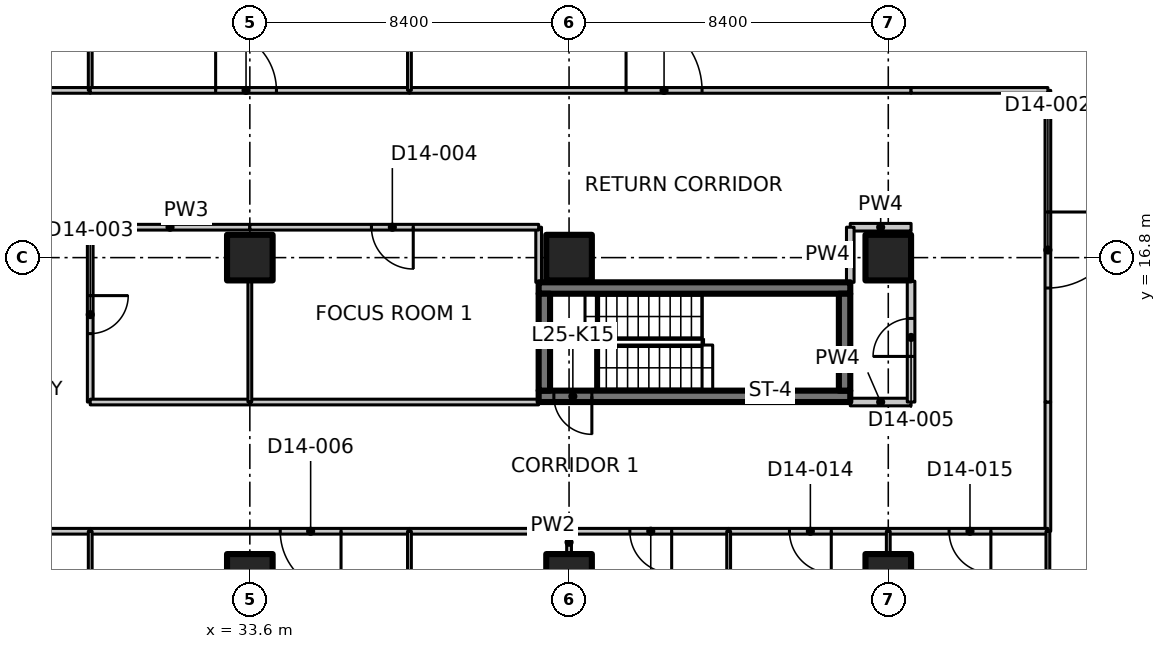
"""IFC4 building model, lengths in metres.
Left out: names, types, materials, properties, quantities, classifications, styles, units other than length and angle.
Written with IfcOpenShell. Run it as: python <this file> out.ifc"""

import sys

from ifc_helpers import new_model, si_unit, direction, frame, frame_2d, origin, origin_2d, place, context, subcontext, project, spatial, polyline, rectangle, outline, extrude, element, fill, save


model = new_model("IFC4")
c1 = context("Model", 3, precision=1e-05, world=origin(), true_north=direction((0.0, 1.0)))
c2 = subcontext(c1, "Body", "Model", "MODEL_VIEW")
j1 = project(units=[si_unit("LENGTHUNIT", "METRE"), si_unit("PLANEANGLEUNIT", "RADIAN")], contexts=[c1])
p1 = place(None, origin())
s1 = spatial("IfcSite", under=j1, at=p1, CompositionType="ELEMENT")
p2 = place(p1, origin())
s2 = spatial("IfcBuilding", under=s1, at=p2, CompositionType="ELEMENT")
p3 = place(p2, frame((0.0, 0.0, 106.1)))
s3 = spatial("IfcBuildingStorey", under=s2, at=p3, CompositionType="ELEMENT", Elevation=106.1)
for number, where, z_axis, x_axis in (
    (1, (33.6, 8.4, 0.0), (0.0, 0.0, 1.0), (1.0, 0.0, 0.0)),
    (2, (33.6, 16.8, 0.0), (0.0, 0.0, 1.0), (1.0, 0.0, 0.0)),
    (3, (42.0, 8.4, 0.0), (0.0, 0.0, 1.0), (1.0, 0.0, 0.0)),
    (4, (42.0, 16.8, 0.0), (0.0, 0.0, 1.0), (1.0, 0.0, 0.0)),
    (5, (50.4, 8.4, 0.0), (0.0, 0.0, 1.0), (1.0, 0.0, 0.0)),
    (6, (50.4, 16.8, 0.0), (0.0, 0.0, 1.0), (1.0, 0.0, 0.0)),
):
    element("IfcColumn", number, at=place(p3, frame(where, z_axis=z_axis, x_axis=x_axis)), inside=s3, PredefinedType="COLUMN", context=c2, shape_type="SweptSolid", body=[
        extrude(rectangle(XDim=1.2, YDim=1.2, at=origin_2d()), origin(), (0.0, 0.0, 1.0), 3.35),
    ])
p4 = place(p3, frame((49.4, 13.15, 0.0), z_axis=(0.0, 0.0, 1.0), x_axis=(-1.0, 0.0, 0.0)))
e7 = element("IfcWall", 7, at=p4, inside=s3, PredefinedType="SHEAR", context=c2, shape_type="SweptSolid", body=[
    extrude(rectangle(XDim=8.2, YDim=0.3, at=frame_2d((4.1, 0.0))), origin(), (0.0, 0.0, 1.0), 3.35),
])
p5 = place(p4, frame((6.8, 0.0, 0.0)))
e8 = element("IfcOpeningElement", 8, at=p5, cuts=e7, PredefinedType="OPENING", context=c2, shape_type="SweptSolid", body=[
    extrude(rectangle(XDim=1.0, YDim=2.1, at=frame_2d((0.5, 1.05))), frame((0.0, 0.16, 0.0), z_axis=(0.0, -1.0, 0.0), x_axis=(1.0, 0.0, 0.0)), (0.0, 0.0, 1.0), 0.32),
])
p6 = place(p3, frame((41.2, 16.0, 0.0), z_axis=(0.0, 0.0, 1.0), x_axis=(1.0, 0.0, 0.0)))
e9 = element("IfcWall", 9, at=p6, inside=s3, PredefinedType="SHEAR", context=c2, shape_type="SweptSolid", body=[
    extrude(rectangle(XDim=8.2, YDim=0.3, at=frame_2d((4.1, 0.0))), origin(), (0.0, 0.0, 1.0), 3.35),
])
for number, where, z_axis, x_axis in (
    (10, (41.35, 13.3, 0.0), (0.0, 0.0, 1.0), (0.0, 1.0, 0.0)),
    (11, (49.25, 13.3, 0.0), (0.0, 0.0, 1.0), (0.0, 1.0, 0.0)),
):
    element("IfcWall", number, at=place(p3, frame(where, z_axis=z_axis, x_axis=x_axis)), inside=s3, PredefinedType="SHEAR", context=c2, shape_type="SweptSolid", body=[
        extrude(rectangle(XDim=2.55, YDim=0.3, at=frame_2d((1.275, 0.0))), origin(), (0.0, 0.0, 1.0), 3.35),
    ])
p7 = place(p3, frame((25.2, 21.2, 0.0), z_axis=(0.0, 0.0, 1.0), x_axis=(1.0, 0.0, 0.0)))
e12 = element("IfcWall", 12, at=p7, inside=s3, PredefinedType="PARTITIONING", context=c2, shape_type="SweptSolid", body=[
    extrude(rectangle(XDim=4.2, YDim=0.15, at=frame_2d((2.1, 0.0))), origin(), (0.0, 0.0, 1.0), 3.33),
])
p8 = place(p3, frame((29.4, 17.6, 0.0), z_axis=(0.0, 0.0, 1.0), x_axis=(0.0, -1.0, 0.0)))
e13 = element("IfcWall", 13, at=p8, inside=s3, PredefinedType="PARTITIONING", context=c2, shape_type="SweptSolid", body=[
    extrude(rectangle(XDim=4.6, YDim=0.15, at=frame_2d((2.3, 0.0))), origin(), (0.0, 0.0, 1.0), 3.33),
])
p9 = place(p8, frame((1.8, 0.0, 0.0)))
e14 = element("IfcOpeningElement", 14, at=p9, cuts=e13, PredefinedType="OPENING", context=c2, shape_type="SweptSolid", body=[
    extrude(rectangle(XDim=1.0, YDim=2.1, at=frame_2d((0.5, 1.05))), frame((0.0, 0.085, 0.0), z_axis=(0.0, -1.0, 0.0), x_axis=(1.0, 0.0, 0.0)), (0.0, 0.0, 1.0), 0.17),
])
p10 = place(p3, frame((29.4, 9.6, 0.0), z_axis=(0.0, 0.0, 1.0), x_axis=(-1.0, 0.0, 0.0)))
e15 = element("IfcWall", 15, at=p10, inside=s3, PredefinedType="PARTITIONING", context=c2, shape_type="SweptSolid", body=[
    extrude(rectangle(XDim=4.2, YDim=0.15, at=frame_2d((2.1, 0.0))), origin(), (0.0, 0.0, 1.0), 3.33),
])
p11 = place(p3, frame((29.4, 27.511, 0.0), z_axis=(0.0, 0.0, 1.0), x_axis=(0.0, -1.0, 0.0)))
e16 = element("IfcWall", 16, at=p11, inside=s3, PredefinedType="PARTITIONING", context=c2, shape_type="SweptSolid", body=[
    extrude(outline(polyline([(0.0, 0.0), (6.311, 0.0), (6.311, 3.33), (2.761, 3.33), (2.759, 2.98), (1.863, 2.98), (1.861, 3.33), (0.236, 3.33), (0.0, 3.33), (0.0, 0.0)])), frame((0.0, 0.05, 0.0), z_axis=(0.0, -1.0, 0.0), x_axis=(1.0, 0.0, 0.0)), (0.0, 0.0, 1.0), 0.1),
])
p12 = place(p3, frame((54.6, 13.0, 0.0), z_axis=(0.0, 0.0, 1.0), x_axis=(0.0, -1.0, 0.0)))
e17 = element("IfcWall", 17, at=p12, inside=s3, PredefinedType="PARTITIONING", context=c2, shape_type="SweptSolid", body=[
    extrude(rectangle(XDim=3.4, YDim=0.15, at=frame_2d((1.7, 0.0))), origin(), (0.0, 0.0, 1.0), 3.33),
])
p13 = place(p3, frame((29.4, 13.0, 0.0), z_axis=(0.0, 0.0, 1.0), x_axis=(1.0, 0.0, 0.0)))
e18 = element("IfcWall", 18, at=p13, inside=s3, PredefinedType="PARTITIONING", context=c2, shape_type="SweptSolid", body=[
    extrude(rectangle(XDim=4.2, YDim=0.15, at=frame_2d((2.1, 0.0))), origin(), (0.0, 0.0, 1.0), 3.33),
])
p14 = place(p3, frame((33.6, 13.0, 0.0), z_axis=(0.0, 0.0, 1.0), x_axis=(1.0, 0.0, 0.0)))
e19 = element("IfcWall", 19, at=p14, inside=s3, PredefinedType="PARTITIONING", context=c2, shape_type="SweptSolid", body=[
    extrude(rectangle(XDim=7.6, YDim=0.15, at=frame_2d((3.8, 0.0))), origin(), (0.0, 0.0, 1.0), 3.33),
])
p15 = place(p3, frame((49.4, 13.0, 0.0), z_axis=(0.0, 0.0, 1.0), x_axis=(1.0, 0.0, 0.0)))
e20 = element("IfcWall", 20, at=p15, inside=s3, PredefinedType="PARTITIONING", context=c2, shape_type="SweptSolid", body=[
    extrude(rectangle(XDim=1.6, YDim=0.2, at=frame_2d((0.8, 0.0))), origin(), (0.0, 0.0, 1.0), 3.33),
])
p16 = place(p3, frame((37.8, 9.6, 0.0), z_axis=(0.0, 0.0, 1.0), x_axis=(-1.0, 0.0, 0.0)))
e21 = element("IfcWall", 21, at=p16, inside=s3, PredefinedType="PARTITIONING", context=c2, shape_type="SweptSolid", body=[
    extrude(rectangle(XDim=8.4, YDim=0.15, at=frame_2d((4.2, 0.0))), origin(), (0.0, 0.0, 1.0), 3.33),
])
p17 = place(p16, frame((1.8, 0.0, 0.0)))
e22 = element("IfcOpeningElement", 22, at=p17, cuts=e21, PredefinedType="OPENING", context=c2, shape_type="SweptSolid", body=[
    extrude(rectangle(XDim=1.6, YDim=2.1, at=frame_2d((0.8, 1.05))), frame((0.0, 0.085, 0.0), z_axis=(0.0, -1.0, 0.0), x_axis=(1.0, 0.0, 0.0)), (0.0, 0.0, 1.0), 0.17),
])
p18 = place(p3, frame((42.0, 9.6, 0.0), z_axis=(0.0, 0.0, 1.0), x_axis=(-1.0, 0.0, 0.0)))
e23 = element("IfcWall", 23, at=p18, inside=s3, PredefinedType="PARTITIONING", context=c2, shape_type="SweptSolid", body=[
    extrude(rectangle(XDim=4.2, YDim=0.15, at=frame_2d((2.1, 0.0))), origin(), (0.0, 0.0, 1.0), 3.33),
])
p19 = place(p3, frame((46.2, 9.6, 0.0), z_axis=(0.0, 0.0, 1.0), x_axis=(-1.0, 0.0, 0.0)))
e24 = element("IfcWall", 24, at=p19, inside=s3, PredefinedType="PARTITIONING", context=c2, shape_type="SweptSolid", body=[
    extrude(rectangle(XDim=4.2, YDim=0.15, at=frame_2d((2.1, 0.0))), origin(), (0.0, 0.0, 1.0), 3.33),
])
p20 = place(p19, frame((1.5, 0.0, 0.0)))
e25 = element("IfcOpeningElement", 25, at=p20, cuts=e24, PredefinedType="OPENING", context=c2, shape_type="SweptSolid", body=[
    extrude(rectangle(XDim=1.1, YDim=2.1, at=frame_2d((0.55, 1.05))), frame((0.0, 0.085, 0.0), z_axis=(0.0, -1.0, 0.0), x_axis=(1.0, 0.0, 0.0)), (0.0, 0.0, 1.0), 0.17),
])
p21 = place(p3, frame((50.4, 9.6, 0.0), z_axis=(0.0, 0.0, 1.0), x_axis=(-1.0, 0.0, 0.0)))
e26 = element("IfcWall", 26, at=p21, inside=s3, PredefinedType="PARTITIONING", context=c2, shape_type="SweptSolid", body=[
    extrude(rectangle(XDim=4.2, YDim=0.15, at=frame_2d((2.1, 0.0))), origin(), (0.0, 0.0, 1.0), 3.33),
])
p22 = place(p21, frame((1.5, 0.0, 0.0)))
e27 = element("IfcOpeningElement", 27, at=p22, cuts=e26, PredefinedType="OPENING", context=c2, shape_type="SweptSolid", body=[
    extrude(rectangle(XDim=1.1, YDim=2.1, at=frame_2d((0.55, 1.05))), frame((0.0, 0.085, 0.0), z_axis=(0.0, -1.0, 0.0), x_axis=(1.0, 0.0, 0.0)), (0.0, 0.0, 1.0), 0.17),
])
p23 = place(p3, frame((54.6, 9.6, 0.0), z_axis=(0.0, 0.0, 1.0), x_axis=(-1.0, 0.0, 0.0)))
e28 = element("IfcWall", 28, at=p23, inside=s3, PredefinedType="PARTITIONING", context=c2, shape_type="SweptSolid", body=[
    extrude(rectangle(XDim=4.2, YDim=0.15, at=frame_2d((2.1, 0.0))), origin(), (0.0, 0.0, 1.0), 3.33),
])
p24 = place(p23, frame((1.5, 0.0, 0.0)))
e29 = element("IfcOpeningElement", 29, at=p24, cuts=e28, PredefinedType="OPENING", context=c2, shape_type="SweptSolid", body=[
    extrude(rectangle(XDim=1.1, YDim=2.1, at=frame_2d((0.55, 1.05))), frame((0.0, 0.085, 0.0), z_axis=(0.0, -1.0, 0.0), x_axis=(1.0, 0.0, 0.0)), (0.0, 0.0, 1.0), 0.17),
])
p25 = place(p3, frame((54.6, 21.2, 0.0), z_axis=(0.0, 0.0, 1.0), x_axis=(0.0, -1.0, 0.0)))
e30 = element("IfcWall", 30, at=p25, inside=s3, PredefinedType="PARTITIONING", context=c2, shape_type="SweptSolid", body=[
    extrude(rectangle(XDim=8.2, YDim=0.15, at=frame_2d((4.1, 0.0))), origin(), (0.0, 0.0, 1.0), 3.33),
])
p26 = place(p25, frame((3.2, 0.0, 0.0)))
e31 = element("IfcOpeningElement", 31, at=p26, cuts=e30, PredefinedType="OPENING", context=c2, shape_type="SweptSolid", body=[
    extrude(rectangle(XDim=2.0, YDim=2.4, at=frame_2d((1.0, 1.2))), frame((0.0, 0.085, 0.0), z_axis=(0.0, -1.0, 0.0), x_axis=(1.0, 0.0, 0.0)), (0.0, 0.0, 1.0), 0.17),
])
p27 = place(p3, frame((54.6, -1.174, 0.0), z_axis=(0.0, 0.0, 1.0), x_axis=(0.0, 1.0, 0.0)))
e32 = element("IfcWall", 32, at=p27, inside=s3, PredefinedType="PARTITIONING", context=c2, shape_type="SweptSolid", body=[
    extrude(outline(polyline([(0.0, 0.0), (10.774, 0.0), (10.774, 3.33), (1.624, 3.33), (1.622, 2.98), (0.726, 2.98), (0.724, 3.33), (0.074, 3.33), (0.0, 3.33), (0.0, 0.0)])), frame((0.0, 0.05, 0.0), z_axis=(0.0, -1.0, 0.0), x_axis=(1.0, 0.0, 0.0)), (0.0, 0.0, 1.0), 0.1),
])
p28 = place(p3, frame((33.6, 17.6, 0.0), z_axis=(0.0, 0.0, 1.0), x_axis=(-1.0, 0.0, 0.0)))
e33 = element("IfcWall", 33, at=p28, inside=s3, PredefinedType="PARTITIONING", context=c2, shape_type="SweptSolid", body=[
    extrude(rectangle(XDim=4.2, YDim=0.15, at=frame_2d((2.1, 0.0))), origin(), (0.0, 0.0, 1.0), 3.33),
])
p29 = place(p3, frame((41.2, 16.15, 0.0), z_axis=(0.0, 0.0, 1.0), x_axis=(0.0, 1.0, 0.0)))
e34 = element("IfcWall", 34, at=p29, inside=s3, PredefinedType="PARTITIONING", context=c2, shape_type="SweptSolid", body=[
    extrude(rectangle(XDim=1.45, YDim=0.15, at=frame_2d((0.725, 0.0))), origin(), (0.0, 0.0, 1.0), 3.33),
])
p30 = place(p3, frame((41.2, 17.6, 0.0), z_axis=(0.0, 0.0, 1.0), x_axis=(-1.0, 0.0, 0.0)))
e35 = element("IfcWall", 35, at=p30, inside=s3, PredefinedType="PARTITIONING", context=c2, shape_type="SweptSolid", body=[
    extrude(rectangle(XDim=7.6, YDim=0.15, at=frame_2d((3.8, 0.0))), origin(), (0.0, 0.0, 1.0), 3.33),
])
p31 = place(p30, frame((3.3, 0.0, 0.0)))
e36 = element("IfcOpeningElement", 36, at=p31, cuts=e35, PredefinedType="OPENING", context=c2, shape_type="SweptSolid", body=[
    extrude(rectangle(XDim=1.1, YDim=2.1, at=frame_2d((0.55, 1.05))), frame((0.0, 0.085, 0.0), z_axis=(0.0, -1.0, 0.0), x_axis=(1.0, 0.0, 0.0)), (0.0, 0.0, 1.0), 0.17),
])
p32 = place(p3, frame((51.0, 17.6, 0.0), z_axis=(0.0, 0.0, 1.0), x_axis=(-1.0, 0.0, 0.0)))
e37 = element("IfcWall", 37, at=p32, inside=s3, PredefinedType="PARTITIONING", context=c2, shape_type="SweptSolid", body=[
    extrude(rectangle(XDim=1.6, YDim=0.2, at=frame_2d((0.8, 0.0))), origin(), (0.0, 0.0, 1.0), 3.33),
])
p33 = place(p3, frame((49.4, 17.6, 0.0), z_axis=(0.0, 0.0, 1.0), x_axis=(0.0, -1.0, 0.0)))
e38 = element("IfcWall", 38, at=p33, inside=s3, PredefinedType="PARTITIONING", context=c2, shape_type="SweptSolid", body=[
    extrude(rectangle(XDim=1.45, YDim=0.2, at=frame_2d((0.725, 0.0))), origin(), (0.0, 0.0, 1.0), 3.33),
])
p34 = place(p3, frame((29.4, 21.2, 0.0), z_axis=(0.0, 0.0, 1.0), x_axis=(1.0, 0.0, 0.0)))
e39 = element("IfcWall", 39, at=p34, inside=s3, PredefinedType="PARTITIONING", context=c2, shape_type="SweptSolid", body=[
    extrude(rectangle(XDim=8.4, YDim=0.15, at=frame_2d((4.2, 0.0))), origin(), (0.0, 0.0, 1.0), 3.33),
])
p35 = place(p34, frame((3.3, 0.0, 0.0)))
e40 = element("IfcOpeningElement", 40, at=p35, cuts=e39, PredefinedType="OPENING", context=c2, shape_type="SweptSolid", body=[
    extrude(rectangle(XDim=1.6, YDim=2.1, at=frame_2d((0.8, 1.05))), frame((0.0, 0.085, 0.0), z_axis=(0.0, -1.0, 0.0), x_axis=(1.0, 0.0, 0.0)), (0.0, 0.0, 1.0), 0.17),
])
p36 = place(p3, frame((37.8, 21.2, 0.0), z_axis=(0.0, 0.0, 1.0), x_axis=(1.0, 0.0, 0.0)))
e41 = element("IfcWall", 41, at=p36, inside=s3, PredefinedType="PARTITIONING", context=c2, shape_type="SweptSolid", body=[
    extrude(rectangle(XDim=13.2, YDim=0.15, at=frame_2d((6.6, 0.0))), origin(), (0.0, 0.0, 1.0), 3.33),
])
p37 = place(p36, frame((5.7, 0.0, 0.0)))
e42 = element("IfcOpeningElement", 42, at=p37, cuts=e41, PredefinedType="OPENING", context=c2, shape_type="SweptSolid", body=[
    extrude(rectangle(XDim=2.0, YDim=2.4, at=frame_2d((1.0, 1.2))), frame((0.0, 0.085, 0.0), z_axis=(0.0, -1.0, 0.0), x_axis=(1.0, 0.0, 0.0)), (0.0, 0.0, 1.0), 0.17),
])
p38 = place(p3, frame((51.0, 13.0, 0.0), z_axis=(0.0, 0.0, 1.0), x_axis=(0.0, 1.0, 0.0)))
e43 = element("IfcWall", 43, at=p38, inside=s3, PredefinedType="PARTITIONING", context=c2, shape_type="SweptSolid", body=[
    extrude(rectangle(XDim=3.18, YDim=0.2, at=frame_2d((1.59, 0.0))), origin(), (0.0, 0.0, 1.0), 3.33),
])
p39 = place(p38, frame((1.2, 0.0, 0.0)))
e44 = element("IfcOpeningElement", 44, at=p39, cuts=e43, PredefinedType="OPENING", context=c2, shape_type="SweptSolid", body=[
    extrude(rectangle(XDim=1.0, YDim=2.1, at=frame_2d((0.5, 1.05))), frame((0.0, 0.11, 0.0), z_axis=(0.0, -1.0, 0.0), x_axis=(1.0, 0.0, 0.0)), (0.0, 0.0, 1.0), 0.22),
])
p40 = place(p3, frame((51.0, 21.2, 0.0), z_axis=(0.0, 0.0, 1.0), x_axis=(1.0, 0.0, 0.0)))
e45 = element("IfcWall", 45, at=p40, inside=s3, PredefinedType="PARTITIONING", context=c2, shape_type="SweptSolid", body=[
    extrude(rectangle(XDim=3.6, YDim=0.15, at=frame_2d((1.8, 0.0))), origin(), (0.0, 0.0, 1.0), 3.33),
])
p41 = place(p3, frame((33.6, 16.18, 0.0), z_axis=(0.0, 0.0, 1.0), x_axis=(0.0, -1.0, 0.0)))
e46 = element("IfcWall", 46, at=p41, inside=s3, PredefinedType="PARTITIONING", context=c2, shape_type="SweptSolid", body=[
    extrude(rectangle(XDim=3.18, YDim=0.1, at=frame_2d((1.59, 0.0))), origin(), (0.0, 0.0, 1.0), 3.33),
])
p42 = place(p3, frame((37.8, 9.6, 0.0), z_axis=(0.0, 0.0, 1.0), x_axis=(0.0, -1.0, 0.0)))
e47 = element("IfcWall", 47, at=p42, inside=s3, PredefinedType="PARTITIONING", context=c2, shape_type="SweptSolid", body=[
    extrude(rectangle(XDim=4.2, YDim=0.1, at=frame_2d((2.1, 0.0))), origin(), (0.0, 0.0, 1.0), 3.33),
])
p43 = place(p3, frame((29.4, 6.0, 0.0), z_axis=(0.0, 0.0, 1.0), x_axis=(0.0, 1.0, 0.0)))
e48 = element("IfcWall", 48, at=p43, inside=s3, PredefinedType="PARTITIONING", context=c2, shape_type="SweptSolid", body=[
    extrude(rectangle(XDim=3.6, YDim=0.1, at=frame_2d((1.8, 0.0))), origin(), (0.0, 0.0, 1.0), 3.33),
])
p44 = place(p3, frame((42.0, 9.6, 0.0), z_axis=(0.0, 0.0, 1.0), x_axis=(0.0, -1.0, 0.0)))
e49 = element("IfcWall", 49, at=p44, inside=s3, PredefinedType="PARTITIONING", context=c2, shape_type="SweptSolid", body=[
    extrude(rectangle(XDim=0.58, YDim=0.125, at=frame_2d((0.29, 0.0))), origin(), (0.0, 0.0, 1.0), 3.33),
])
p45 = place(p3, frame((46.2, 9.6, 0.0), z_axis=(0.0, 0.0, 1.0), x_axis=(0.0, -1.0, 0.0)))
e50 = element("IfcWall", 50, at=p45, inside=s3, PredefinedType="PARTITIONING", context=c2, shape_type="SweptSolid", body=[
    extrude(outline(polyline([(0.0, 0.0), (10.774, 0.0), (10.774, 3.33), (10.7, 3.33), (10.05, 3.33), (10.048, 2.98), (9.152, 2.98), (9.15, 3.33), (0.0, 3.33), (0.0, 0.0)])), frame((0.0, 0.05, 0.0), z_axis=(0.0, -1.0, 0.0), x_axis=(1.0, 0.0, 0.0)), (0.0, 0.0, 1.0), 0.1),
])
p46 = place(p3, frame((50.4, 9.6, 0.0), z_axis=(0.0, 0.0, 1.0), x_axis=(0.0, -1.0, 0.0)))
e51 = element("IfcWall", 51, at=p46, inside=s3, PredefinedType="PARTITIONING", context=c2, shape_type="SweptSolid", body=[
    extrude(rectangle(XDim=0.58, YDim=0.1, at=frame_2d((0.29, 0.0))), origin(), (0.0, 0.0, 1.0), 3.33),
])
p47 = place(p3, frame((37.8, 30.526, 0.0), z_axis=(0.0, 0.0, 1.0), x_axis=(0.0, -1.0, 0.0)))
e52 = element("IfcWall", 52, at=p47, inside=s3, PredefinedType="PARTITIONING", context=c2, shape_type="SweptSolid", body=[
    extrude(outline(polyline([(0.0, 0.0), (9.326, 0.0), (9.326, 3.33), (5.776, 3.33), (5.774, 2.98), (4.878, 2.98), (4.876, 3.33), (0.283, 3.33), (0.0, 3.33), (0.0, 0.0)])), frame((0.0, 0.05, 0.0), z_axis=(0.0, -1.0, 0.0), x_axis=(1.0, 0.0, 0.0)), (0.0, 0.0, 1.0), 0.1),
])
p48 = place(p5, origin())
e53 = element("IfcDoor", 53, at=p48, inside=s3, OperationType="SINGLE_SWING_LEFT", PredefinedType="DOOR", context=c2, shape_type="SweptSolid", body=[
    extrude(rectangle(XDim=1.0, YDim=2.1, at=frame_2d((0.5, 1.05))), frame((0.0, 0.025, 0.0), z_axis=(0.0, -1.0, 0.0), x_axis=(1.0, 0.0, 0.0)), (0.0, 0.0, 1.0), 0.05),
])
fill(e8, e53)
p49 = place(p26, origin())
e54 = element("IfcDoor", 54, at=p49, inside=s3, OperationType="DOUBLE_DOOR_SINGLE_SWING", PredefinedType="DOOR", context=c2, shape_type="SweptSolid", body=[
    extrude(rectangle(XDim=2.0, YDim=2.4, at=frame_2d((1.0, 1.2))), frame((0.0, 0.025, 0.0), z_axis=(0.0, -1.0, 0.0), x_axis=(1.0, 0.0, 0.0)), (0.0, 0.0, 1.0), 0.05),
])
fill(e31, e54)
p50 = place(p9, origin())
e55 = element("IfcDoor", 55, at=p50, inside=s3, OperationType="SINGLE_SWING_LEFT", PredefinedType="DOOR", context=c2, shape_type="SweptSolid", body=[
    extrude(rectangle(XDim=1.0, YDim=2.1, at=frame_2d((0.5, 1.05))), frame((0.0, 0.025, 0.0), z_axis=(0.0, -1.0, 0.0), x_axis=(1.0, 0.0, 0.0)), (0.0, 0.0, 1.0), 0.05),
])
fill(e14, e55)
p51 = place(p31, origin())
e56 = element("IfcDoor", 56, at=p51, inside=s3, OperationType="SINGLE_SWING_LEFT", PredefinedType="DOOR", context=c2, shape_type="SweptSolid", body=[
    extrude(rectangle(XDim=1.1, YDim=2.1, at=frame_2d((0.55, 1.05))), frame((0.0, 0.025, 0.0), z_axis=(0.0, -1.0, 0.0), x_axis=(1.0, 0.0, 0.0)), (0.0, 0.0, 1.0), 0.05),
])
fill(e36, e56)
p52 = place(p39, origin())
e57 = element("IfcDoor", 57, at=p52, inside=s3, OperationType="SINGLE_SWING_LEFT", PredefinedType="DOOR", context=c2, shape_type="SweptSolid", body=[
    extrude(rectangle(XDim=1.0, YDim=2.1, at=frame_2d((0.5, 1.05))), frame((0.0, 0.025, 0.0), z_axis=(0.0, -1.0, 0.0), x_axis=(1.0, 0.0, 0.0)), (0.0, 0.0, 1.0), 0.05),
])
fill(e44, e57)
p53 = place(p17, origin())
e58 = element("IfcDoor", 58, at=p53, inside=s3, OperationType="DOUBLE_DOOR_SINGLE_SWING", PredefinedType="DOOR", context=c2, shape_type="SweptSolid", body=[
    extrude(rectangle(XDim=1.6, YDim=2.1, at=frame_2d((0.8, 1.05))), frame((0.0, 0.025, 0.0), z_axis=(0.0, -1.0, 0.0), x_axis=(1.0, 0.0, 0.0)), (0.0, 0.0, 1.0), 0.05),
])
fill(e22, e58)
p54 = place(p20, origin())
e59 = element("IfcDoor", 59, at=p54, inside=s3, OperationType="SINGLE_SWING_LEFT", PredefinedType="DOOR", context=c2, shape_type="SweptSolid", body=[
    extrude(rectangle(XDim=1.1, YDim=2.1, at=frame_2d((0.55, 1.05))), frame((0.0, 0.025, 0.0), z_axis=(0.0, -1.0, 0.0), x_axis=(1.0, 0.0, 0.0)), (0.0, 0.0, 1.0), 0.05),
])
fill(e25, e59)
p55 = place(p22, origin())
e60 = element("IfcDoor", 60, at=p55, inside=s3, OperationType="SINGLE_SWING_LEFT", PredefinedType="DOOR", context=c2, shape_type="SweptSolid", body=[
    extrude(rectangle(XDim=1.1, YDim=2.1, at=frame_2d((0.55, 1.05))), frame((0.0, 0.025, 0.0), z_axis=(0.0, -1.0, 0.0), x_axis=(1.0, 0.0, 0.0)), (0.0, 0.0, 1.0), 0.05),
])
fill(e27, e60)
p56 = place(p24, origin())
e61 = element("IfcDoor", 61, at=p56, inside=s3, OperationType="SINGLE_SWING_LEFT", PredefinedType="DOOR", context=c2, shape_type="SweptSolid", body=[
    extrude(rectangle(XDim=1.1, YDim=2.1, at=frame_2d((0.55, 1.05))), frame((0.0, 0.025, 0.0), z_axis=(0.0, -1.0, 0.0), x_axis=(1.0, 0.0, 0.0)), (0.0, 0.0, 1.0), 0.05),
])
fill(e29, e61)
p57 = place(p35, origin())
e62 = element("IfcDoor", 62, at=p57, inside=s3, OperationType="DOUBLE_DOOR_SINGLE_SWING", PredefinedType="DOOR", context=c2, shape_type="SweptSolid", body=[
    extrude(rectangle(XDim=1.6, YDim=2.1, at=frame_2d((0.8, 1.05))), frame((0.0, 0.025, 0.0), z_axis=(0.0, -1.0, 0.0), x_axis=(1.0, 0.0, 0.0)), (0.0, 0.0, 1.0), 0.05),
])
fill(e40, e62)
p58 = place(p37, origin())
e63 = element("IfcDoor", 63, at=p58, inside=s3, OperationType="DOUBLE_DOOR_SINGLE_SWING", PredefinedType="DOOR", context=c2, shape_type="SweptSolid", body=[
    extrude(rectangle(XDim=2.0, YDim=2.4, at=frame_2d((1.0, 1.2))), frame((0.0, 0.025, 0.0), z_axis=(0.0, -1.0, 0.0), x_axis=(1.0, 0.0, 0.0)), (0.0, 0.0, 1.0), 0.05),
])
fill(e42, e63)
save(model, sys.argv[1])
